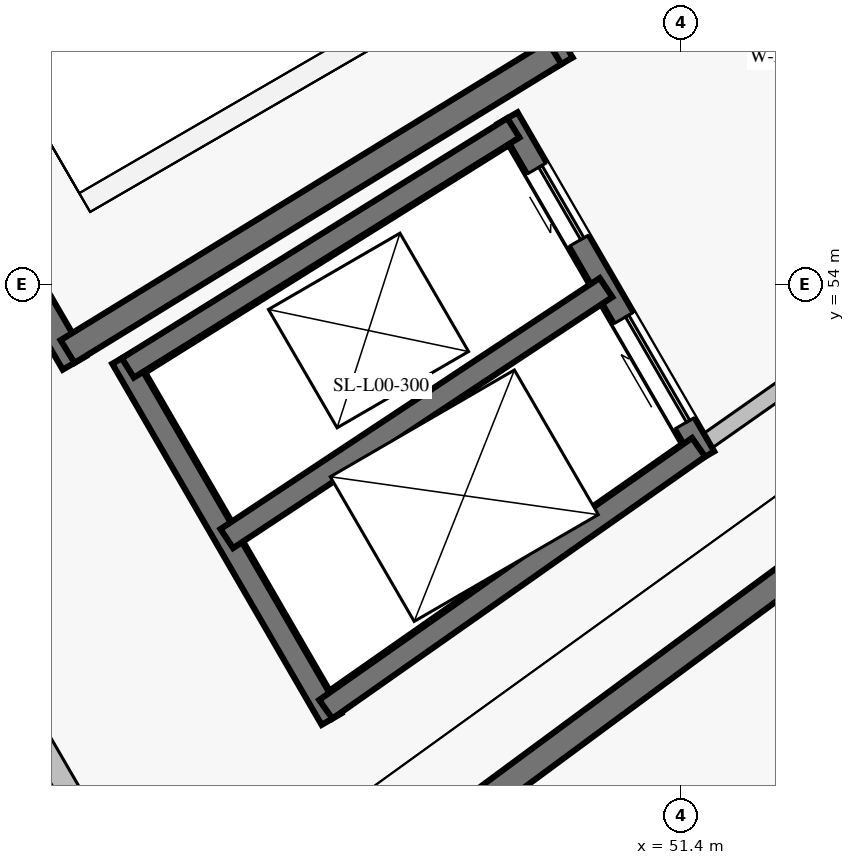
"""IFC4 building model, lengths in metres.
Left out: names, types, materials, properties, quantities, classifications, styles, units other than length and angle.
Written with IfcOpenShell. Run it as: python <this file> out.ifc"""

import sys

from ifc_helpers import new_model, si_unit, direction, frame, frame_2d, origin, place, context, subcontext, project, spatial, rectangle, extrude, element, fill, save


model = new_model("IFC4")
c1 = context("Model", 3, precision=1e-05, world=origin(), true_north=direction((0.0, 1.0)))
c2 = subcontext(c1, "Body", "Model", "MODEL_VIEW")
j1 = project(units=[si_unit("LENGTHUNIT", "METRE"), si_unit("PLANEANGLEUNIT", "RADIAN")], contexts=[c1])
p1 = place(None, origin())
s1 = spatial("IfcSite", under=j1, at=p1, CompositionType="ELEMENT")
p2 = place(p1, origin())
s2 = spatial("IfcBuilding", under=s1, at=p2, CompositionType="ELEMENT")
p3 = place(p2, origin())
s3 = spatial("IfcBuildingStorey", under=s2, at=p3, CompositionType="ELEMENT", Elevation=0.0)
p4 = place(p3, frame((34.311, 62.913, 0.0), z_axis=(0.0, 0.0, 1.0), x_axis=(0.501609752715, -0.865094015689, 0.0)))
e1 = element("IfcWall", 1, at=p4, inside=s3, PredefinedType="SOLIDWALL", context=c2, shape_type="SweptSolid", body=[
    extrude(rectangle(XDim=19.932, YDim=0.3, at=frame_2d((9.966, 0.0))), origin(), (0.0, 0.0, 1.0), 4.8),
])
p5 = place(p4, frame((1.05, 0.0, 0.0)))
e2 = element("IfcOpeningElement", 2, at=p5, cuts=e1, PredefinedType="OPENING", context=c2, shape_type="SweptSolid", body=[
    extrude(rectangle(XDim=2.0, YDim=2.3, at=frame_2d((1.0, 1.15))), frame((0.0, 0.16, 0.0), z_axis=(0.0, -1.0, 0.0), x_axis=(1.0, 0.0, 0.0)), (0.0, 0.0, 1.0), 0.32),
])
p6 = place(p3, frame((44.09, 66.788, 0.0), z_axis=(0.0, 0.0, 1.0), x_axis=(0.501628624814, -0.865083072755, 0.0)))
e3 = element("IfcWall", 3, at=p6, inside=s3, PredefinedType="SHEAR", context=c2, shape_type="SweptSolid", body=[
    extrude(rectangle(XDim=11.435, YDim=0.35, at=frame_2d((5.718, 0.0))), origin(), (0.0, 0.0, 1.0), 5.5),
])
p7 = place(p6, frame((0.475, 0.0, 0.0)))
e4 = element("IfcOpeningElement", 4, at=p7, cuts=e3, PredefinedType="OPENING", context=c2, shape_type="SweptSolid", body=[
    extrude(rectangle(XDim=1.8, YDim=2.2, at=frame_2d((0.9, 1.1))), frame((0.0, 0.185, 0.0), z_axis=(0.0, -1.0, 0.0), x_axis=(1.0, 0.0, 0.0)), (0.0, 0.0, 1.0), 0.37),
])
p8 = place(p3, frame((37.198, 63.695, 0.0), z_axis=(0.0, 0.0, 1.0), x_axis=(0.501601740165, -0.865098661577, 0.0)))
e5 = element("IfcWall", 5, at=p8, inside=s3, PredefinedType="SHEAR", context=c2, shape_type="SweptSolid", body=[
    extrude(rectangle(XDim=12.405, YDim=0.35, at=frame_2d((6.202, 0.0))), origin(), (0.0, 0.0, 1.0), 5.5),
])
p9 = place(p8, frame((0.637, 0.0, 0.0)))
e6 = element("IfcOpeningElement", 6, at=p9, cuts=e5, PredefinedType="OPENING", context=c2, shape_type="SweptSolid", body=[
    extrude(rectangle(XDim=1.8, YDim=2.2, at=frame_2d((0.9, 1.1))), frame((0.0, 0.185, 0.0), z_axis=(0.0, -1.0, 0.0), x_axis=(1.0, 0.0, 0.0)), (0.0, 0.0, 1.0), 0.37),
])
p10 = place(p3, frame((49.739, 57.046, 0.0), z_axis=(0.0, 0.0, 1.0), x_axis=(-0.852334575619, -0.522996913188, 0.0)))
e7 = element("IfcWall", 7, at=p10, inside=s3, PredefinedType="SHEAR", context=c2, shape_type="SweptSolid", body=[
    extrude(rectangle(XDim=7.516, YDim=0.35, at=frame_2d((3.758, 0.0))), origin(), (0.0, 0.0, 1.0), 5.5),
])
p11 = place(p3, frame((49.123, 56.188, 0.0), z_axis=(0.0, 0.0, 1.0), x_axis=(0.501629534056, -0.86508254552, 0.0)))
e8 = element("IfcWall", 8, at=p11, inside=s3, PredefinedType="SHEAR", context=c2, shape_type="SweptSolid", body=[
    extrude(rectangle(XDim=5.157, YDim=0.3, at=frame_2d((2.579, 0.0))), origin(), (0.0, 0.0, 1.0), 5.5),
])
p12 = place(p11, frame((0.766, 0.0, 0.0)))
e9 = element("IfcOpeningElement", 9, at=p12, cuts=e8, PredefinedType="OPENING", context=c2, shape_type="SweptSolid", body=[
    extrude(rectangle(XDim=1.1, YDim=2.2, at=frame_2d((0.55, 1.1))), frame((0.0, 0.16, 0.0), z_axis=(0.0, -1.0, 0.0), x_axis=(1.0, 0.0, 0.0)), (0.0, 0.0, 1.0), 0.32),
])
p13 = place(p11, frame((3.042, 0.0, 0.0)))
e10 = element("IfcOpeningElement", 10, at=p13, cuts=e8, PredefinedType="OPENING", context=c2, shape_type="SweptSolid", body=[
    extrude(rectangle(XDim=1.6, YDim=2.3, at=frame_2d((0.8, 1.15))), frame((0.0, 0.16, 0.0), z_axis=(0.0, -1.0, 0.0), x_axis=(1.0, 0.0, 0.0)), (0.0, 0.0, 1.0), 0.32),
])
p14 = place(p3, frame((44.05, 53.03, 0.0), z_axis=(0.0, 0.0, 1.0), x_axis=(0.501596987756, -0.865101417103, 0.0)))
e11 = element("IfcWall", 11, at=p14, inside=s3, PredefinedType="SHEAR", context=c2, shape_type="SweptSolid", body=[
    extrude(rectangle(XDim=5.491, YDim=0.3, at=frame_2d((2.746, 0.0))), origin(), (0.0, 0.0, 1.0), 5.5),
])
p15 = place(p3, frame((49.198, 56.058, 0.0), z_axis=(0.0, 0.0, 1.0), x_axis=(-0.848938067893, -0.528492343257, 0.0)))
e12 = element("IfcWall", 12, at=p15, inside=s3, PredefinedType="SHEAR", context=c2, shape_type="SweptSolid", body=[
    extrude(rectangle(XDim=5.975, YDim=0.3, at=frame_2d((2.988, 0.0))), origin(), (0.0, 0.0, 1.0), 5.5),
])
p16 = place(p3, frame((51.635, 51.855, 0.0), z_axis=(0.0, 0.0, 1.0), x_axis=(-0.818205158105, -0.574926359851, 0.0)))
e13 = element("IfcWall", 13, at=p16, inside=s3, PredefinedType="SHEAR", context=c2, shape_type="SweptSolid", body=[
    extrude(rectangle(XDim=5.995, YDim=0.3, at=frame_2d((2.998, 0.0))), origin(), (0.0, 0.0, 1.0), 5.5),
])
p17 = place(p3, frame((50.417, 53.957, 0.0), z_axis=(0.0, 0.0, 1.0), x_axis=(-0.833878900042, -0.551947443209, 0.0)))
e14 = element("IfcWall", 14, at=p17, inside=s3, PredefinedType="SHEAR", context=c2, shape_type="SweptSolid", body=[
    extrude(rectangle(XDim=5.983, YDim=0.3, at=frame_2d((2.991, 0.0))), origin(), (0.0, 0.0, 1.0), 5.5),
])
p18 = place(p3, frame((46.774, 67.921, 0.0), z_axis=(0.0, 0.0, 1.0), x_axis=(0.501612626242, -0.865092349518, 0.0)))
e15 = element("IfcWall", 15, at=p18, inside=s3, PredefinedType="SOLIDWALL", context=c2, shape_type="SweptSolid", body=[
    extrude(rectangle(XDim=16.11, YDim=0.22, at=frame_2d((8.055, 0.0))), origin(), (0.0, 0.0, 1.0), 4.448),
])
p19 = place(p18, frame((6.511, 0.0, 0.0)))
e16 = element("IfcOpeningElement", 16, at=p19, cuts=e15, PredefinedType="OPENING", context=c2, shape_type="SweptSolid", body=[
    extrude(rectangle(XDim=1.5, YDim=2.2, at=frame_2d((0.75, 1.1))), frame((0.0, 0.12, 0.0), z_axis=(0.0, -1.0, 0.0), x_axis=(1.0, 0.0, 0.0)), (0.0, 0.0, 1.0), 0.24),
])
p20 = place(p3, frame((54.8, 54.079, 0.0), z_axis=(0.0, 0.0, 1.0), x_axis=(-0.818225400643, -0.574897550649, 0.0)))
e17 = element("IfcWall", 17, at=p20, inside=s3, PredefinedType="SOLIDWALL", context=c2, shape_type="SweptSolid", body=[
    extrude(rectangle(XDim=3.868, YDim=0.22, at=frame_2d((1.934, 0.0))), origin(), (0.0, 0.0, 1.0), 5.5),
])
p21 = place(p3, frame((53.691, 50.811, 0.0), z_axis=(0.0, 0.0, 1.0), x_axis=(-0.804395625347, -0.594093997548, 0.0)))
e18 = element("IfcWall", 18, at=p21, inside=s3, PredefinedType="SHEAR", context=c2, shape_type="SweptSolid", body=[
    extrude(rectangle(XDim=7.534, YDim=0.35, at=frame_2d((3.767, 0.0))), origin(), (0.0, 0.0, 1.0), 5.5),
])
p22 = place(p12, origin())
e19 = element("IfcDoor", 19, at=p22, inside=s3, OperationType="SLIDING_TO_RIGHT", PredefinedType="DOOR", context=c2, shape_type="SweptSolid", body=[
    extrude(rectangle(XDim=1.1, YDim=2.2, at=frame_2d((0.55, 1.1))), frame((0.0, 0.025, 0.0), z_axis=(0.0, -1.0, 0.0), x_axis=(1.0, 0.0, 0.0)), (0.0, 0.0, 1.0), 0.05),
])
fill(e9, e19)
p23 = place(p13, origin())
e20 = element("IfcDoor", 20, at=p23, inside=s3, OperationType="SLIDING_TO_LEFT", PredefinedType="DOOR", context=c2, shape_type="SweptSolid", body=[
    extrude(rectangle(XDim=1.6, YDim=2.3, at=frame_2d((0.8, 1.15))), frame((0.0, 0.025, 0.0), z_axis=(0.0, -1.0, 0.0), x_axis=(1.0, 0.0, 0.0)), (0.0, 0.0, 1.0), 0.05),
])
fill(e10, e20)
save(model, sys.argv[1])
